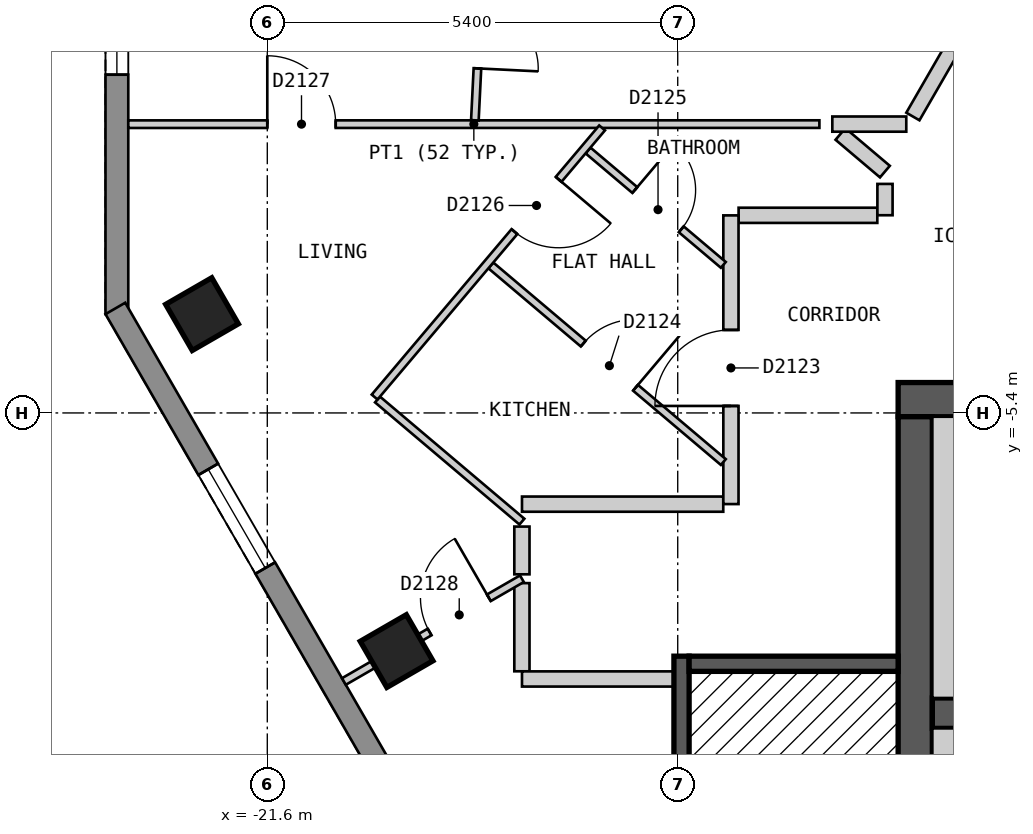
"""IFC4 building model, lengths in metres.
Left out: names, types, materials, properties, quantities, classifications, styles, units other than length and angle.
Written with IfcOpenShell. Run it as: python <this file> out.ifc"""

import sys

from ifc_helpers import new_model, si_unit, direction, frame, frame_2d, origin, origin_2d, place, context, subcontext, project, spatial, polyline, rectangle, outline, extrude, element, fill, save


model = new_model("IFC4")
c1 = context("Model", 3, precision=1e-05, world=origin(), true_north=direction((0.0, 1.0)))
c2 = subcontext(c1, "Body", "Model", "MODEL_VIEW")
j1 = project(units=[si_unit("LENGTHUNIT", "METRE"), si_unit("PLANEANGLEUNIT", "RADIAN")], contexts=[c1])
p1 = place(None, origin())
s1 = spatial("IfcSite", under=j1, at=p1, CompositionType="ELEMENT")
p2 = place(p1, origin())
s2 = spatial("IfcBuilding", under=s1, at=p2, CompositionType="ELEMENT")
p3 = place(p2, frame((0.0, 0.0, 211.8)))
s3 = spatial("IfcBuildingStorey", under=s2, at=p3, CompositionType="ELEMENT", Elevation=211.8)
for number, where, z_axis, x_axis in (
    (1, (-22.459, -4.1, 0.0), (0.0, 0.0, 1.0), (0.5, -0.866, 0.0)),
    (2, (-19.899, -8.533, 0.0), (0.0, 0.0, 1.0), (0.5, -0.866, 0.0)),
):
    element("IfcColumn", number, at=place(p3, frame(where, z_axis=z_axis, x_axis=x_axis)), inside=s3, PredefinedType="COLUMN", context=c2, shape_type="SweptSolid", body=[
        extrude(rectangle(XDim=0.7, YDim=0.7, at=origin_2d()), origin(), (0.0, 0.0, 1.0), 3.0),
    ])
p4 = place(p3, frame((-13.3, -5.225, 0.0), z_axis=(0.0, 0.0, 1.0), x_axis=(1.0, 0.0, 0.0)))
e3 = element("IfcWall", 3, at=p4, inside=s3, PredefinedType="SHEAR", context=c2, shape_type="SweptSolid", body=[
    extrude(rectangle(XDim=26.6, YDim=0.45, at=frame_2d((13.3, 0.0))), origin(), (0.0, 0.0, 1.0), 2.7),
])
p5 = place(p4, frame((23.65, 0.0, 0.0)))
e4 = element("IfcOpeningElement", 4, at=p5, cuts=e3, PredefinedType="OPENING", context=c2, shape_type="SweptSolid", body=[
    extrude(rectangle(XDim=1.2, YDim=2.1, at=frame_2d((0.6, 1.05))), frame((0.0, 0.235, 0.0), z_axis=(0.0, -1.0, 0.0), x_axis=(1.0, 0.0, 0.0)), (0.0, 0.0, 1.0), 0.47),
])
p6 = place(p3, frame((-13.075, -18.55, 0.0), z_axis=(0.0, 0.0, 1.0), x_axis=(0.0, 1.0, 0.0)))
e5 = element("IfcWall", 5, at=p6, inside=s3, PredefinedType="SHEAR", context=c2, shape_type="SweptSolid", body=[
    extrude(rectangle(XDim=13.1, YDim=0.45, at=frame_2d((6.55, 0.0))), origin(), (0.0, 0.0, 1.0), 2.7),
])
p7 = place(p6, frame((4.35, 0.0, 0.0)))
e6 = element("IfcOpeningElement", 6, at=p7, cuts=e5, PredefinedType="OPENING", context=c2, shape_type="SweptSolid", body=[
    extrude(rectangle(XDim=1.2, YDim=2.1, at=frame_2d((0.6, 1.05))), frame((0.0, 0.235, 0.0), z_axis=(0.0, -1.0, 0.0), x_axis=(1.0, 0.0, 0.0)), (0.0, 0.0, 1.0), 0.47),
])
p8 = place(p3, frame((-12.85, -9.35, 0.0), z_axis=(0.0, 0.0, 1.0), x_axis=(1.0, 0.0, 0.0)))
e7 = element("IfcWall", 7, at=p8, inside=s3, PredefinedType="SHEAR", context=c2, shape_type="SweptSolid", body=[
    extrude(rectangle(XDim=23.05, YDim=0.4, at=frame_2d((11.525, 0.0))), origin(), (0.0, 0.0, 1.0), 2.7),
])
p9 = place(p8, frame((1.45, 0.0, 0.0)))
e8 = element("IfcOpeningElement", 8, at=p9, cuts=e7, PredefinedType="OPENING", context=c2, shape_type="SweptSolid", body=[
    extrude(rectangle(XDim=1.1, YDim=2.1, at=frame_2d((0.55, 1.05))), frame((0.0, 0.21, 0.0), z_axis=(0.0, -1.0, 0.0), x_axis=(1.0, 0.0, 0.0)), (0.0, 0.0, 1.0), 0.42),
])
p10 = place(p8, frame((4.25, 0.0, 0.0)))
e9 = element("IfcOpeningElement", 9, at=p10, cuts=e7, PredefinedType="OPENING", context=c2, shape_type="SweptSolid", body=[
    extrude(rectangle(XDim=1.1, YDim=2.1, at=frame_2d((0.55, 1.05))), frame((0.0, 0.21, 0.0), z_axis=(0.0, -1.0, 0.0), x_axis=(1.0, 0.0, 0.0)), (0.0, 0.0, 1.0), 0.42),
])
p11 = place(p8, frame((7.05, 0.0, 0.0)))
e10 = element("IfcOpeningElement", 10, at=p11, cuts=e7, PredefinedType="OPENING", context=c2, shape_type="SweptSolid", body=[
    extrude(rectangle(XDim=1.1, YDim=2.1, at=frame_2d((0.55, 1.05))), frame((0.0, 0.21, 0.0), z_axis=(0.0, -1.0, 0.0), x_axis=(1.0, 0.0, 0.0)), (0.0, 0.0, 1.0), 0.42),
])
p12 = place(p8, frame((9.35, 0.0, 0.0)))
e11 = element("IfcOpeningElement", 11, at=p12, cuts=e7, PredefinedType="OPENING", context=c2, shape_type="SweptSolid", body=[
    extrude(rectangle(XDim=1.1, YDim=2.1, at=frame_2d((0.55, 1.05))), frame((0.0, 0.21, 0.0), z_axis=(0.0, -1.0, 0.0), x_axis=(1.0, 0.0, 0.0)), (0.0, 0.0, 1.0), 0.42),
])
p13 = place(p8, frame((11.65, 0.0, 0.0)))
e12 = element("IfcOpeningElement", 12, at=p13, cuts=e7, PredefinedType="OPENING", context=c2, shape_type="SweptSolid", body=[
    extrude(rectangle(XDim=1.1, YDim=2.1, at=frame_2d((0.55, 1.05))), frame((0.0, 0.21, 0.0), z_axis=(0.0, -1.0, 0.0), x_axis=(1.0, 0.0, 0.0)), (0.0, 0.0, 1.0), 0.42),
])
p14 = place(p8, frame((13.95, 0.0, 0.0)))
e13 = element("IfcOpeningElement", 13, at=p14, cuts=e7, PredefinedType="OPENING", context=c2, shape_type="SweptSolid", body=[
    extrude(rectangle(XDim=1.1, YDim=2.1, at=frame_2d((0.55, 1.05))), frame((0.0, 0.21, 0.0), z_axis=(0.0, -1.0, 0.0), x_axis=(1.0, 0.0, 0.0)), (0.0, 0.0, 1.0), 0.42),
])
p15 = place(p8, frame((16.25, 0.0, 0.0)))
e14 = element("IfcOpeningElement", 14, at=p15, cuts=e7, PredefinedType="OPENING", context=c2, shape_type="SweptSolid", body=[
    extrude(rectangle(XDim=1.1, YDim=2.1, at=frame_2d((0.55, 1.05))), frame((0.0, 0.21, 0.0), z_axis=(0.0, -1.0, 0.0), x_axis=(1.0, 0.0, 0.0)), (0.0, 0.0, 1.0), 0.42),
])
p16 = place(p8, frame((18.55, 0.0, 0.0)))
e15 = element("IfcOpeningElement", 15, at=p16, cuts=e7, PredefinedType="OPENING", context=c2, shape_type="SweptSolid", body=[
    extrude(rectangle(XDim=1.1, YDim=2.1, at=frame_2d((0.55, 1.05))), frame((0.0, 0.21, 0.0), z_axis=(0.0, -1.0, 0.0), x_axis=(1.0, 0.0, 0.0)), (0.0, 0.0, 1.0), 0.42),
])
p17 = place(p8, frame((20.95, 0.0, 0.0)))
e16 = element("IfcOpeningElement", 16, at=p17, cuts=e7, PredefinedType="OPENING", context=c2, shape_type="SweptSolid", body=[
    extrude(rectangle(XDim=1.1, YDim=2.1, at=frame_2d((0.55, 1.05))), frame((0.0, 0.21, 0.0), z_axis=(0.0, -1.0, 0.0), x_axis=(1.0, 0.0, 0.0)), (0.0, 0.0, 1.0), 0.42),
])
p18 = place(p3, frame((-23.579, 0.9, 0.0), z_axis=(0.0, 0.0, 1.0), x_axis=(0.0, -1.0, 0.0)))
e17 = element("IfcWall", 17, at=p18, inside=s3, PredefinedType="SOLIDWALL", context=c2, shape_type="SweptSolid", body=[
    extrude(outline(polyline([(0.0, -0.15), (5.0, -0.15), (4.92, 0.15), (0.08, 0.15), (0.0, -0.15)])), origin(), (0.0, 0.0, 1.0), 2.7),
])
p19 = place(p18, frame((0.65, 0.0, 0.15)))
e18 = element("IfcOpeningElement", 18, at=p19, cuts=e17, PredefinedType="OPENING", context=c2, shape_type="SweptSolid", body=[
    extrude(rectangle(XDim=1.2, YDim=2.1, at=frame_2d((0.6, 1.05))), frame((0.0, 0.16, 0.0), z_axis=(0.0, -1.0, 0.0), x_axis=(1.0, 0.0, 0.0)), (0.0, 0.0, 1.0), 0.32),
])
p20 = place(p3, frame((-23.599, -4.025, 0.0), z_axis=(0.0, 0.0, 1.0), x_axis=(0.500012653391, -0.866018098222, 0.0)))
e19 = element("IfcWall", 19, at=p20, inside=s3, PredefinedType="SOLIDWALL", context=c2, shape_type="SweptSolid", body=[
    extrude(outline(polyline([(0.0, -0.15), (16.628, -0.15), (16.548, 0.15), (0.08, 0.15), (0.0, -0.15)])), origin(), (0.0, 0.0, 1.0), 2.7),
])
p21 = place(p20, frame((2.444, 0.0, 0.15)))
e20 = element("IfcOpeningElement", 20, at=p21, cuts=e19, PredefinedType="OPENING", context=c2, shape_type="SweptSolid", body=[
    extrude(rectangle(XDim=1.5, YDim=2.1, at=frame_2d((0.75, 1.05))), frame((0.0, 0.16, 0.0), z_axis=(0.0, -1.0, 0.0), x_axis=(1.0, 0.0, 0.0)), (0.0, 0.0, 1.0), 0.32),
])
p22 = place(p20, frame((7.564, 0.0, 0.15)))
e21 = element("IfcOpeningElement", 21, at=p22, cuts=e19, PredefinedType="OPENING", context=c2, shape_type="SweptSolid", body=[
    extrude(rectangle(XDim=1.5, YDim=2.1, at=frame_2d((0.75, 1.05))), frame((0.0, 0.16, 0.0), z_axis=(0.0, -1.0, 0.0), x_axis=(1.0, 0.0, 0.0)), (0.0, 0.0, 1.0), 0.32),
])
p23 = place(p20, frame((12.682, 0.0, 0.15)))
e22 = element("IfcOpeningElement", 22, at=p23, cuts=e19, PredefinedType="OPENING", context=c2, shape_type="SweptSolid", body=[
    extrude(rectangle(XDim=1.5, YDim=2.1, at=frame_2d((0.75, 1.05))), frame((0.0, 0.16, 0.0), z_axis=(0.0, -1.0, 0.0), x_axis=(1.0, 0.0, 0.0)), (0.0, 0.0, 1.0), 0.32),
])
p24 = place(p3, frame((-18.25, -7.639, 0.0), z_axis=(0.0, 0.0, 1.0), x_axis=(0.0, -1.0, 0.0)))
e23 = element("IfcWall", 23, at=p24, inside=s3, PredefinedType="PARTITIONING", context=c2, shape_type="SweptSolid", body=[
    extrude(rectangle(XDim=1.16, YDim=0.2, at=frame_2d((0.58, 0.0))), origin(), (0.0, 0.0, 1.0), 2.7),
])
p25 = place(p3, frame((-18.249, -6.6, 0.0), z_axis=(0.0, 0.0, 1.0), x_axis=(1.0, 0.0, 0.0)))
e24 = element("IfcWall", 24, at=p25, inside=s3, PredefinedType="PARTITIONING", context=c2, shape_type="SweptSolid", body=[
    extrude(rectangle(XDim=2.648, YDim=0.2, at=frame_2d((1.324, 0.0))), origin(), (0.0, 0.0, 1.0), 2.7),
])
p26 = place(p3, frame((-18.249, -8.9, 0.0), z_axis=(0.0, 0.0, 1.0), x_axis=(1.0, 0.0, 0.0)))
e25 = element("IfcWall", 25, at=p26, inside=s3, PredefinedType="PARTITIONING", context=c2, shape_type="SweptSolid", body=[
    extrude(rectangle(XDim=2.199, YDim=0.2, at=frame_2d((1.1, 0.0))), origin(), (0.0, 0.0, 1.0), 2.7),
])
p27 = place(p3, frame((-15.399, -2.8, 0.0), z_axis=(0.0, 0.0, 1.0), x_axis=(1.0, 0.0, 0.0)))
e26 = element("IfcWall", 26, at=p27, inside=s3, PredefinedType="PARTITIONING", context=c2, shape_type="SweptSolid", body=[
    extrude(rectangle(XDim=1.825, YDim=0.2, at=frame_2d((0.913, 0.0))), origin(), (0.0, 0.0, 1.0), 2.7),
])
p28 = place(p3, frame((-13.106, -1.5, 0.0), z_axis=(0.0, 0.0, 1.0), x_axis=(0.500025705601, 0.86601056214, 0.0)))
e27 = element("IfcWall", 27, at=p28, inside=s3, PredefinedType="PARTITIONING", context=c2, shape_type="SweptSolid", body=[
    extrude(rectangle(XDim=7.735, YDim=0.2, at=frame_2d((3.868, 0.0))), origin(), (0.0, 0.0, 1.0), 2.7),
])
p29 = place(p28, frame((4.748, 0.0, 0.0)))
e28 = element("IfcOpeningElement", 28, at=p29, cuts=e27, PredefinedType="OPENING", context=c2, shape_type="SweptSolid", body=[
    extrude(rectangle(XDim=1.0, YDim=2.1, at=frame_2d((0.5, 1.05))), frame((0.0, 0.11, 0.0), z_axis=(0.0, -1.0, 0.0), x_axis=(1.0, 0.0, 0.0)), (0.0, 0.0, 1.0), 0.22),
])
p30 = place(p3, frame((-13.473, -2.799, 0.0), z_axis=(0.0, 0.0, 1.0), x_axis=(0.0, 1.0, 0.0)))
e29 = element("IfcWall", 29, at=p30, inside=s3, PredefinedType="PARTITIONING", context=c2, shape_type="SweptSolid", body=[
    extrude(rectangle(XDim=0.412, YDim=0.2, at=frame_2d((0.206, 0.0))), origin(), (0.0, 0.0, 1.0), 2.7),
])
p31 = place(p3, frame((-15.5, -6.599, 0.0), z_axis=(0.0, 0.0, 1.0), x_axis=(0.0, 1.0, 0.0)))
e30 = element("IfcWall", 30, at=p31, inside=s3, PredefinedType="PARTITIONING", context=c2, shape_type="SweptSolid", body=[
    extrude(rectangle(XDim=3.798, YDim=0.2, at=frame_2d((1.899, 0.0))), origin(), (0.0, 0.0, 1.0), 2.7),
])
p32 = place(p31, frame((1.291, 0.0, 0.0)))
e31 = element("IfcOpeningElement", 31, at=p32, cuts=e30, PredefinedType="OPENING", context=c2, shape_type="SweptSolid", body=[
    extrude(rectangle(XDim=1.0, YDim=2.1, at=frame_2d((0.5, 1.05))), frame((0.0, 0.11, 0.0), z_axis=(0.0, -1.0, 0.0), x_axis=(1.0, 0.0, 0.0)), (0.0, 0.0, 1.0), 0.22),
])
p33 = place(p3, frame((-18.25, -7.523, 0.0), z_axis=(0.0, 0.0, 1.0), x_axis=(0.0, 1.0, 0.0)))
e32 = element("IfcWall", 32, at=p33, inside=s3, PredefinedType="PARTITIONING", context=c2, shape_type="SweptSolid", body=[
    extrude(rectangle(XDim=0.628, YDim=0.2, at=frame_2d((0.314, 0.0))), origin(), (0.0, 0.0, 1.0), 2.7),
])
p34 = place(p3, frame((-17.38, -1.947, 0.0), z_axis=(0.0, 0.0, 1.0), x_axis=(0.763616683524, -0.645669854217, 0.0)))
e33 = element("IfcWall", 33, at=p34, inside=s3, PredefinedType="PARTITIONING", context=c2, shape_type="SweptSolid", body=[
    extrude(rectangle(XDim=2.331, YDim=0.1, at=frame_2d((1.166, 0.0))), origin(), (0.0, 0.0, 1.0), 2.7),
])
p35 = place(p34, frame((0.806, 0.0, 0.0)))
e34 = element("IfcOpeningElement", 34, at=p35, cuts=e33, PredefinedType="OPENING", context=c2, shape_type="SweptSolid", body=[
    extrude(rectangle(XDim=0.8, YDim=2.1, at=frame_2d((0.4, 1.05))), frame((0.0, 0.06, 0.0), z_axis=(0.0, -1.0, 0.0), x_axis=(1.0, 0.0, 0.0)), (0.0, 0.0, 1.0), 0.12),
])
p36 = place(p3, frame((-18.659, -3.459, 0.0), z_axis=(0.0, 0.0, 1.0), x_axis=(0.763550385572, -0.64574825489, 0.0)))
e35 = element("IfcWall", 35, at=p36, inside=s3, PredefinedType="PARTITIONING", context=c2, shape_type="SweptSolid", body=[
    extrude(rectangle(XDim=4.006, YDim=0.1, at=frame_2d((2.003, 0.0))), origin(), (0.0, 0.0, 1.0), 2.7),
])
p37 = place(p36, frame((1.593, 0.0, 0.0)))
e36 = element("IfcOpeningElement", 36, at=p37, cuts=e35, PredefinedType="OPENING", context=c2, shape_type="SweptSolid", body=[
    extrude(rectangle(XDim=0.9, YDim=2.1, at=frame_2d((0.45, 1.05))), frame((0.0, 0.06, 0.0), z_axis=(0.0, -1.0, 0.0), x_axis=(1.0, 0.0, 0.0)), (0.0, 0.0, 1.0), 0.12),
])
p38 = place(p3, frame((-20.15, -5.223, 0.0), z_axis=(0.0, 0.0, 1.0), x_axis=(0.763471868926, -0.645841083672, 0.0)))
e37 = element("IfcWall", 37, at=p38, inside=s3, PredefinedType="PARTITIONING", context=c2, shape_type="SweptSolid", body=[
    extrude(rectangle(XDim=2.489, YDim=0.1, at=frame_2d((1.244, 0.0))), origin(), (0.0, 0.0, 1.0), 2.7),
])
p39 = place(p3, frame((-23.429, -1.601, 0.0), z_axis=(0.0, 0.0, 1.0), x_axis=(0.999999994233, 0.000107396965, 0.0)))
e38 = element("IfcWall", 38, at=p39, inside=s3, PredefinedType="PARTITIONING", context=c2, shape_type="SweptSolid", body=[
    extrude(rectangle(XDim=9.093, YDim=0.1, at=frame_2d((4.546, 0.0))), origin(), (0.0, 0.0, 1.0), 2.7),
])
p40 = place(p39, frame((1.829, 0.0, 0.0)))
e39 = element("IfcOpeningElement", 39, at=p40, cuts=e38, PredefinedType="OPENING", context=c2, shape_type="SweptSolid", body=[
    extrude(rectangle(XDim=0.9, YDim=2.1, at=frame_2d((0.45, 1.05))), frame((0.0, 0.06, 0.0), z_axis=(0.0, -1.0, 0.0), x_axis=(1.0, 0.0, 0.0)), (0.0, 0.0, 1.0), 0.12),
])
p41 = place(p3, frame((-20.188, -5.191, 0.0), z_axis=(0.0, 0.0, 1.0), x_axis=(0.645524337256, 0.763739700429, 0.0)))
e40 = element("IfcWall", 40, at=p41, inside=s3, PredefinedType="PARTITIONING", context=c2, shape_type="SweptSolid", body=[
    extrude(rectangle(XDim=4.636, YDim=0.1, at=frame_2d((2.318, 0.0))), origin(), (0.0, 0.0, 1.0), 2.7),
])
p42 = place(p41, frame((2.85, 0.0, 0.0)))
e41 = element("IfcOpeningElement", 41, at=p42, cuts=e40, PredefinedType="OPENING", context=c2, shape_type="SweptSolid", body=[
    extrude(rectangle(XDim=0.9, YDim=2.1, at=frame_2d((0.45, 1.05))), frame((0.0, 0.06, 0.0), z_axis=(0.0, -1.0, 0.0), x_axis=(1.0, 0.0, 0.0)), (0.0, 0.0, 1.0), 0.12),
])
p43 = place(p3, frame((-18.869, -1.55, 0.0), z_axis=(0.0, 0.0, 1.0), x_axis=(0.049189853645, 0.998789446429, 0.0)))
e42 = element("IfcWall", 42, at=p43, inside=s3, PredefinedType="PARTITIONING", context=c2, shape_type="SweptSolid", body=[
    extrude(rectangle(XDim=1.97, YDim=0.1, at=frame_2d((0.985, 0.0))), origin(), (0.0, 0.0, 1.0), 2.7),
])
p44 = place(p43, frame((0.684, 0.0, 0.0)))
e43 = element("IfcOpeningElement", 43, at=p44, cuts=e42, PredefinedType="OPENING", context=c2, shape_type="SweptSolid", body=[
    extrude(rectangle(XDim=0.8, YDim=2.1, at=frame_2d((0.4, 1.05))), frame((0.0, 0.06, 0.0), z_axis=(0.0, -1.0, 0.0), x_axis=(1.0, 0.0, 0.0)), (0.0, 0.0, 1.0), 0.12),
])
p45 = place(p3, frame((-20.592, -8.933, 0.0), z_axis=(0.0, 0.0, 1.0), x_axis=(0.866045775131, 0.499964714133, 0.0)))
e44 = element("IfcWall", 44, at=p45, inside=s3, PredefinedType="PARTITIONING", context=c2, shape_type="SweptSolid", body=[
    extrude(rectangle(XDim=2.704, YDim=0.1, at=frame_2d((1.352, 0.0))), origin(), (0.0, 0.0, 1.0), 2.7),
])
p46 = place(p45, frame((1.302, 0.0, 0.0)))
e45 = element("IfcOpeningElement", 45, at=p46, cuts=e44, PredefinedType="OPENING", context=c2, shape_type="SweptSolid", body=[
    extrude(rectangle(XDim=0.9, YDim=2.1, at=frame_2d((0.45, 1.05))), frame((0.0, 0.06, 0.0), z_axis=(0.0, -1.0, 0.0), x_axis=(1.0, 0.0, 0.0)), (0.0, 0.0, 1.0), 0.12),
])
p47 = place(p3, frame((-14.059, -1.73, 0.0), z_axis=(0.0, 0.0, 1.0), x_axis=(0.763289607824, -0.64605647941, 0.0)))
e46 = element("IfcWall", 46, at=p47, inside=s3, PredefinedType="PARTITIONING", context=c2, shape_type="SweptSolid", body=[
    extrude(rectangle(XDim=0.766, YDim=0.2, at=frame_2d((0.383, 0.0))), origin(), (0.0, 0.0, 1.0), 2.7),
])
p48 = place(p3, frame((-14.166, -1.6, 0.0), z_axis=(0.0, 0.0, 1.0), x_axis=(1.0, 0.0, 0.0)))
e47 = element("IfcWall", 47, at=p48, inside=s3, PredefinedType="PARTITIONING", context=c2, shape_type="SweptSolid", body=[
    extrude(rectangle(XDim=0.973, YDim=0.2, at=frame_2d((0.486, 0.0))), origin(), (0.0, 0.0, 1.0), 2.7),
])
p49 = place(p3, frame((-16.15, -14.4, 0.0), z_axis=(0.0, 0.0, 1.0), x_axis=(0.0, 1.0, 0.0)))
e48 = element("IfcWall", 48, at=p49, inside=s3, PredefinedType="SOLIDWALL", context=c2, shape_type="SweptSolid", body=[
    extrude(rectangle(XDim=5.8, YDim=0.2, at=frame_2d((2.9, 0.0))), origin(), (0.0, 0.0, 1.0), 2.7),
])
p50 = place(p3, frame((-16.05, -8.7, 0.0), z_axis=(0.0, 0.0, 1.0), x_axis=(1.0, 0.0, 0.0)))
e49 = element("IfcWall", 49, at=p50, inside=s3, PredefinedType="SOLIDWALL", context=c2, shape_type="SweptSolid", body=[
    extrude(rectangle(XDim=2.75, YDim=0.2, at=frame_2d((1.375, 0.0))), origin(), (0.0, 0.0, 1.0), 2.7),
])
p51 = place(p3, frame((-12.475, -13.0, 0.0), z_axis=(0.0, 0.0, 1.0), x_axis=(0.0, 1.0, 0.0)))
e50 = element("IfcWall", 50, at=p51, inside=s3, PredefinedType="PARTITIONING", context=c2, shape_type="SweptSolid", body=[
    extrude(rectangle(XDim=3.45, YDim=0.75, at=frame_2d((1.725, 0.0))), origin(), (0.0, 0.0, 1.0), 2.7),
])
p52 = place(p3, frame((-12.475, -9.15, 0.0), z_axis=(0.0, 0.0, 1.0), x_axis=(0.0, 1.0, 0.0)))
e51 = element("IfcWall", 51, at=p52, inside=s3, PredefinedType="SOLIDWALL", context=c2, shape_type="SweptSolid", body=[
    extrude(rectangle(XDim=3.7, YDim=0.75, at=frame_2d((1.85, 0.0))), origin(), (0.0, 0.0, 1.0), 2.7),
])
p53 = place(p19, origin())
e52 = element("IfcWindow", 52, at=p53, inside=s3, PartitioningType="SINGLE_PANEL", PredefinedType="WINDOW", context=c2, shape_type="SweptSolid", body=[
    extrude(rectangle(XDim=1.2, YDim=2.1, at=frame_2d((0.6, 1.05))), frame((0.0, 0.03, 0.0), z_axis=(0.0, -1.0, 0.0), x_axis=(1.0, 0.0, 0.0)), (0.0, 0.0, 1.0), 0.06),
])
fill(e18, e52)
p54 = place(p21, origin())
e53 = element("IfcWindow", 53, at=p54, inside=s3, PartitioningType="SINGLE_PANEL", PredefinedType="WINDOW", context=c2, shape_type="SweptSolid", body=[
    extrude(rectangle(XDim=1.5, YDim=2.1, at=frame_2d((0.75, 1.05))), frame((0.0, 0.03, 0.0), z_axis=(0.0, -1.0, 0.0), x_axis=(1.0, 0.0, 0.0)), (0.0, 0.0, 1.0), 0.06),
])
fill(e20, e53)
p55 = place(p32, origin())
e54 = element("IfcDoor", 54, at=p55, inside=s3, OperationType="SINGLE_SWING_LEFT", PredefinedType="DOOR", context=c2, shape_type="SweptSolid", body=[
    extrude(rectangle(XDim=1.0, YDim=2.1, at=frame_2d((0.5, 1.05))), frame((0.0, 0.025, 0.0), z_axis=(0.0, -1.0, 0.0), x_axis=(1.0, 0.0, 0.0)), (0.0, 0.0, 1.0), 0.05),
])
fill(e31, e54)
p56 = place(p37, origin())
e55 = element("IfcDoor", 55, at=p56, inside=s3, OperationType="SINGLE_SWING_RIGHT", PredefinedType="DOOR", context=c2, shape_type="SweptSolid", body=[
    extrude(rectangle(XDim=0.9, YDim=2.1, at=frame_2d((0.45, 1.05))), frame((0.0, 0.025, 0.0), z_axis=(0.0, -1.0, 0.0), x_axis=(1.0, 0.0, 0.0)), (0.0, 0.0, 1.0), 0.05),
])
fill(e36, e55)
p57 = place(p35, origin())
e56 = element("IfcDoor", 56, at=p57, inside=s3, OperationType="SINGLE_SWING_LEFT", PredefinedType="DOOR", context=c2, shape_type="SweptSolid", body=[
    extrude(rectangle(XDim=0.8, YDim=2.1, at=frame_2d((0.4, 1.05))), frame((0.0, 0.025, 0.0), z_axis=(0.0, -1.0, 0.0), x_axis=(1.0, 0.0, 0.0)), (0.0, 0.0, 1.0), 0.05),
])
fill(e34, e56)
p58 = place(p42, origin())
e57 = element("IfcDoor", 57, at=p58, inside=s3, OperationType="SINGLE_SWING_RIGHT", PredefinedType="DOOR", context=c2, shape_type="SweptSolid", body=[
    extrude(rectangle(XDim=0.9, YDim=2.1, at=frame_2d((0.45, 1.05))), frame((0.0, 0.025, 0.0), z_axis=(0.0, -1.0, 0.0), x_axis=(1.0, 0.0, 0.0)), (0.0, 0.0, 1.0), 0.05),
])
fill(e41, e57)
p59 = place(p40, origin())
e58 = element("IfcDoor", 58, at=p59, inside=s3, OperationType="SINGLE_SWING_LEFT", PredefinedType="DOOR", context=c2, shape_type="SweptSolid", body=[
    extrude(rectangle(XDim=0.9, YDim=2.1, at=frame_2d((0.45, 1.05))), frame((0.0, 0.025, 0.0), z_axis=(0.0, -1.0, 0.0), x_axis=(1.0, 0.0, 0.0)), (0.0, 0.0, 1.0), 0.05),
])
fill(e39, e58)
p60 = place(p46, origin())
e59 = element("IfcDoor", 59, at=p60, inside=s3, OperationType="SINGLE_SWING_RIGHT", PredefinedType="DOOR", context=c2, shape_type="SweptSolid", body=[
    extrude(rectangle(XDim=0.9, YDim=2.1, at=frame_2d((0.45, 1.05))), frame((0.0, 0.025, 0.0), z_axis=(0.0, -1.0, 0.0), x_axis=(1.0, 0.0, 0.0)), (0.0, 0.0, 1.0), 0.05),
])
fill(e45, e59)
p61 = place(p44, origin())
e60 = element("IfcDoor", 60, at=p61, inside=s3, OperationType="SINGLE_SWING_LEFT", PredefinedType="DOOR", context=c2, shape_type="SweptSolid", body=[
    extrude(rectangle(XDim=0.8, YDim=2.1, at=frame_2d((0.4, 1.05))), frame((0.0, 0.025, 0.0), z_axis=(0.0, -1.0, 0.0), x_axis=(1.0, 0.0, 0.0)), (0.0, 0.0, 1.0), 0.05),
])
fill(e43, e60)
save(model, sys.argv[1])
